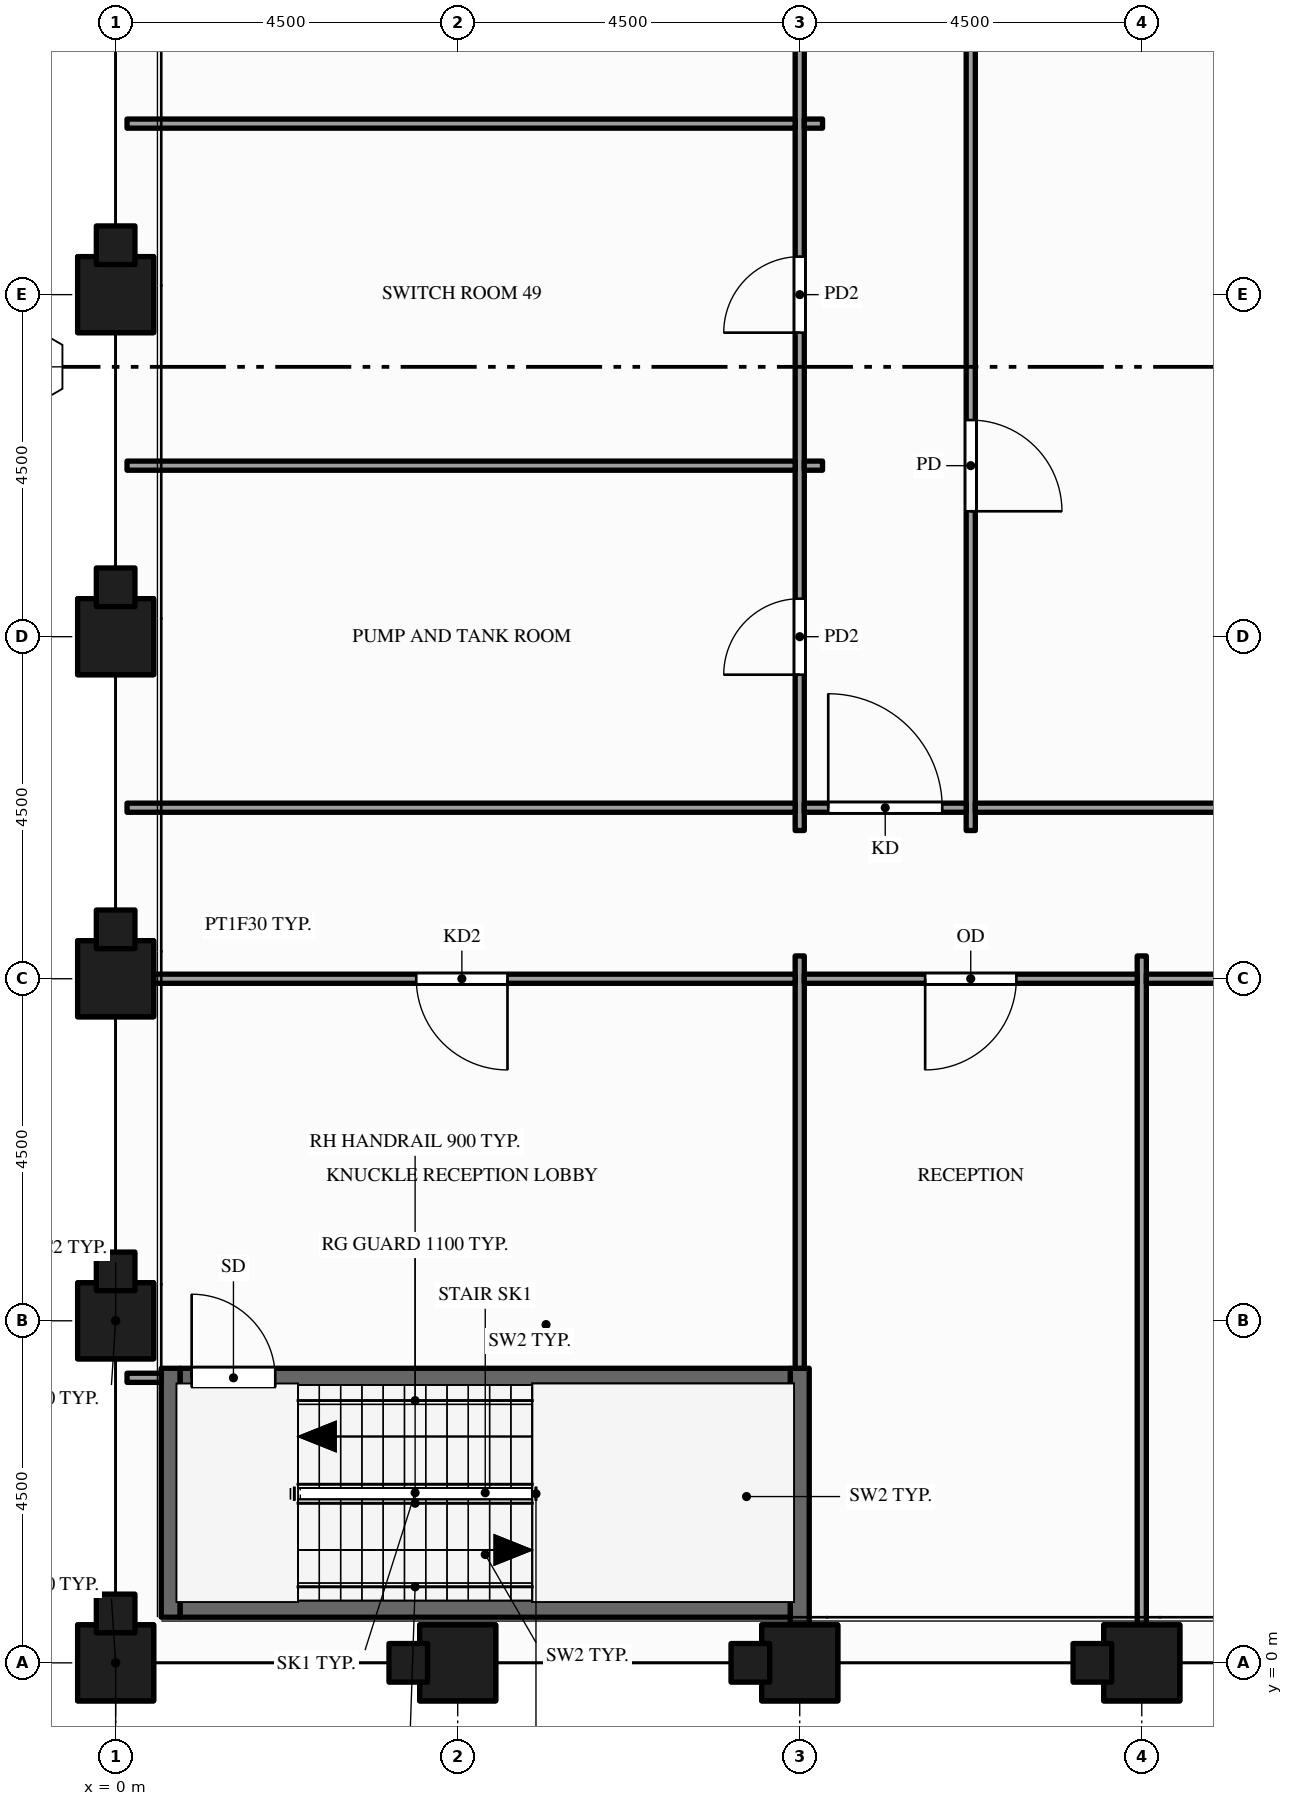
"""IFC4 building model, lengths in metres.
Left out: names, types, materials, properties, quantities, classifications, styles, units other than length and angle.
Written with IfcOpenShell. Run it as: python <this file> out.ifc"""

import sys

from ifc_helpers import new_model, si_unit, direction, frame, frame_2d, origin, origin_2d, place, context, subcontext, project, spatial, rectangle, hollow_rectangle, extrude, element, fill, save


model = new_model("IFC4")
c1 = context("Model", 3, precision=1e-05, world=origin(), true_north=direction((0.0, 1.0)))
c2 = subcontext(c1, "Body", "Model", "MODEL_VIEW")
j1 = project(units=[si_unit("LENGTHUNIT", "METRE"), si_unit("PLANEANGLEUNIT", "RADIAN")], contexts=[c1])
p1 = place(None, origin())
s1 = spatial("IfcSite", under=j1, at=p1, CompositionType="ELEMENT")
p2 = place(p1, origin())
s2 = spatial("IfcBuilding", under=s1, at=p2, CompositionType="ELEMENT")
p3 = place(p2, frame((0.0, 0.0, 131.0)))
s3 = spatial("IfcBuildingStorey", under=s2, at=p3, CompositionType="ELEMENT", Elevation=131.0)
p4 = place(p3, frame((0.0, 0.0, -0.25), z_axis=(0.0, 0.0, 1.0), x_axis=(1.0, 0.0, 0.0)))
e1 = element("IfcColumn", 1, at=p4, inside=s3, PredefinedType="COLUMN", context=c2, shape_type="SweptSolid", body=[
    extrude(hollow_rectangle(XDim=1.0, YDim=1.0, WallThickness=0.05, at=origin_2d()), origin(), (0.0, 0.0, 1.0), 6.6),
])
p5 = place(p3, frame((0.0, 0.0, 6.35), z_axis=(0.0, 0.0, 1.0), x_axis=(1.0, 0.0, 0.0)))
e2 = element("IfcColumn", 2, at=p5, inside=s3, PredefinedType="COLUMN", context=c2, shape_type="SweptSolid", body=[
    extrude(rectangle(XDim=1.0, YDim=1.0, at=origin_2d()), origin(), (0.0, 0.0, 1.0), 1.5),
])
p6 = place(p3, frame((0.0, 4.5, -0.25), z_axis=(0.0, 0.0, 1.0), x_axis=(1.0, 0.0, 0.0)))
e3 = element("IfcColumn", 3, at=p6, inside=s3, PredefinedType="COLUMN", context=c2, shape_type="SweptSolid", body=[
    extrude(hollow_rectangle(XDim=1.0, YDim=1.0, WallThickness=0.05, at=origin_2d()), origin(), (0.0, 0.0, 1.0), 6.6),
])
p7 = place(p3, frame((0.0, 4.5, 6.35), z_axis=(0.0, 0.0, 1.0), x_axis=(1.0, 0.0, 0.0)))
e4 = element("IfcColumn", 4, at=p7, inside=s3, PredefinedType="COLUMN", context=c2, shape_type="SweptSolid", body=[
    extrude(rectangle(XDim=1.0, YDim=1.0, at=origin_2d()), origin(), (0.0, 0.0, 1.0), 1.5),
])
p8 = place(p3, frame((0.0, 9.0, -0.25), z_axis=(0.0, 0.0, 1.0), x_axis=(1.0, 0.0, 0.0)))
e5 = element("IfcColumn", 5, at=p8, inside=s3, PredefinedType="COLUMN", context=c2, shape_type="SweptSolid", body=[
    extrude(hollow_rectangle(XDim=1.0, YDim=1.0, WallThickness=0.05, at=origin_2d()), origin(), (0.0, 0.0, 1.0), 6.6),
])
p9 = place(p3, frame((0.0, 9.0, 6.35), z_axis=(0.0, 0.0, 1.0), x_axis=(1.0, 0.0, 0.0)))
e6 = element("IfcColumn", 6, at=p9, inside=s3, PredefinedType="COLUMN", context=c2, shape_type="SweptSolid", body=[
    extrude(rectangle(XDim=1.0, YDim=1.0, at=origin_2d()), origin(), (0.0, 0.0, 1.0), 1.5),
])
p10 = place(p3, frame((0.0, 13.5, -0.25), z_axis=(0.0, 0.0, 1.0), x_axis=(1.0, 0.0, 0.0)))
e7 = element("IfcColumn", 7, at=p10, inside=s3, PredefinedType="COLUMN", context=c2, shape_type="SweptSolid", body=[
    extrude(hollow_rectangle(XDim=1.0, YDim=1.0, WallThickness=0.05, at=origin_2d()), origin(), (0.0, 0.0, 1.0), 6.6),
])
p11 = place(p3, frame((0.0, 13.5, 6.35), z_axis=(0.0, 0.0, 1.0), x_axis=(1.0, 0.0, 0.0)))
e8 = element("IfcColumn", 8, at=p11, inside=s3, PredefinedType="COLUMN", context=c2, shape_type="SweptSolid", body=[
    extrude(rectangle(XDim=1.0, YDim=1.0, at=origin_2d()), origin(), (0.0, 0.0, 1.0), 1.5),
])
p12 = place(p3, frame((0.0, 18.0, -0.25), z_axis=(0.0, 0.0, 1.0), x_axis=(1.0, 0.0, 0.0)))
e9 = element("IfcColumn", 9, at=p12, inside=s3, PredefinedType="COLUMN", context=c2, shape_type="SweptSolid", body=[
    extrude(hollow_rectangle(XDim=1.0, YDim=1.0, WallThickness=0.05, at=origin_2d()), origin(), (0.0, 0.0, 1.0), 6.6),
])
p13 = place(p3, frame((0.0, 18.0, 6.35), z_axis=(0.0, 0.0, 1.0), x_axis=(1.0, 0.0, 0.0)))
e10 = element("IfcColumn", 10, at=p13, inside=s3, PredefinedType="COLUMN", context=c2, shape_type="SweptSolid", body=[
    extrude(rectangle(XDim=1.0, YDim=1.0, at=origin_2d()), origin(), (0.0, 0.0, 1.0), 1.5),
])
p14 = place(p3, frame((4.5, 0.0, -0.25), z_axis=(0.0, 0.0, 1.0), x_axis=(1.0, 0.0, 0.0)))
e11 = element("IfcColumn", 11, at=p14, inside=s3, PredefinedType="COLUMN", context=c2, shape_type="SweptSolid", body=[
    extrude(hollow_rectangle(XDim=1.0, YDim=1.0, WallThickness=0.05, at=origin_2d()), origin(), (0.0, 0.0, 1.0), 6.6),
])
p15 = place(p3, frame((4.5, 0.0, 6.35), z_axis=(0.0, 0.0, 1.0), x_axis=(1.0, 0.0, 0.0)))
e12 = element("IfcColumn", 12, at=p15, inside=s3, PredefinedType="COLUMN", context=c2, shape_type="SweptSolid", body=[
    extrude(rectangle(XDim=1.0, YDim=1.0, at=origin_2d()), origin(), (0.0, 0.0, 1.0), 1.5),
])
p16 = place(p3, frame((9.0, 0.0, -0.25), z_axis=(0.0, 0.0, 1.0), x_axis=(1.0, 0.0, 0.0)))
e13 = element("IfcColumn", 13, at=p16, inside=s3, PredefinedType="COLUMN", context=c2, shape_type="SweptSolid", body=[
    extrude(hollow_rectangle(XDim=1.0, YDim=1.0, WallThickness=0.05, at=origin_2d()), origin(), (0.0, 0.0, 1.0), 6.6),
])
p17 = place(p3, frame((9.0, 0.0, 6.35), z_axis=(0.0, 0.0, 1.0), x_axis=(1.0, 0.0, 0.0)))
e14 = element("IfcColumn", 14, at=p17, inside=s3, PredefinedType="COLUMN", context=c2, shape_type="SweptSolid", body=[
    extrude(rectangle(XDim=1.0, YDim=1.0, at=origin_2d()), origin(), (0.0, 0.0, 1.0), 1.5),
])
p18 = place(p3, frame((13.5, 0.0, -0.25), z_axis=(0.0, 0.0, 1.0), x_axis=(1.0, 0.0, 0.0)))
e15 = element("IfcColumn", 15, at=p18, inside=s3, PredefinedType="COLUMN", context=c2, shape_type="SweptSolid", body=[
    extrude(hollow_rectangle(XDim=1.0, YDim=1.0, WallThickness=0.05, at=origin_2d()), origin(), (0.0, 0.0, 1.0), 6.6),
])
p19 = place(p3, frame((13.5, 0.0, 6.35), z_axis=(0.0, 0.0, 1.0), x_axis=(1.0, 0.0, 0.0)))
e16 = element("IfcColumn", 16, at=p19, inside=s3, PredefinedType="COLUMN", context=c2, shape_type="SweptSolid", body=[
    extrude(rectangle(XDim=1.0, YDim=1.0, at=origin_2d()), origin(), (0.0, 0.0, 1.0), 1.5),
])
p20 = place(p3, frame((0.725, 0.6, 0.0), z_axis=(0.0, 0.0, 1.0), x_axis=(0.0, 1.0, 0.0)))
e17 = element("IfcWall", 17, at=p20, inside=s3, PredefinedType="SHEAR", context=c2, shape_type="SweptSolid", body=[
    extrude(rectangle(XDim=3.275, YDim=0.25, at=frame_2d((1.637, 0.0))), origin(), (0.0, 0.0, 1.0), 7.85),
])
p21 = place(p3, frame((9.0, 0.15, 0.0), z_axis=(0.0, 0.0, 1.0), x_axis=(0.0, 1.0, 0.0)))
e18 = element("IfcWall", 18, at=p21, inside=s3, PredefinedType="PARTITIONING", context=c2, shape_type="SweptSolid", body=[
    extrude(rectangle(XDim=0.35, YDim=0.12, at=frame_2d((0.175, 0.0))), origin(), (0.0, 0.0, 1.0), 7.85),
])
p22 = place(p3, frame((9.0, 0.5, 0.0), z_axis=(0.0, 0.0, 1.0), x_axis=(0.0, 1.0, 0.0)))
e19 = element("IfcWall", 19, at=p22, inside=s3, PredefinedType="SHEAR", context=c2, shape_type="SweptSolid", body=[
    extrude(rectangle(XDim=3.375, YDim=0.25, at=frame_2d((1.688, 0.0))), origin(), (0.0, 0.0, 1.0), 7.85),
])
p23 = place(p3, frame((9.0, 3.875, 0.0), z_axis=(0.0, 0.0, 1.0), x_axis=(0.0, 1.0, 0.0)))
e20 = element("IfcWall", 20, at=p23, inside=s3, PredefinedType="PARTITIONING", context=c2, shape_type="SweptSolid", body=[
    extrude(rectangle(XDim=5.425, YDim=0.12, at=frame_2d((2.712, 0.0))), origin(), (0.0, 0.0, 1.0), 6.87),
])
p24 = place(p3, frame((9.0, 10.95, 0.0), z_axis=(0.0, 0.0, 1.0), x_axis=(0.0, 1.0, 0.0)))
e21 = element("IfcWall", 21, at=p24, inside=s3, PredefinedType="PARTITIONING", context=c2, shape_type="SweptSolid", body=[
    extrude(rectangle(XDim=20.85, YDim=0.12, at=frame_2d((10.425, 0.0))), origin(), (0.0, 0.0, 1.0), 6.6),
])
p25 = place(p24, frame((2.05, 0.0, 0.0)))
e22 = element("IfcOpeningElement", 22, at=p25, cuts=e21, PredefinedType="OPENING", context=c2, shape_type="SweptSolid", body=[
    extrude(rectangle(XDim=1.0, YDim=2.1, at=frame_2d((0.5, 1.05))), frame((0.0, 0.07, 0.0), z_axis=(0.0, -1.0, 0.0), x_axis=(1.0, 0.0, 0.0)), (0.0, 0.0, 1.0), 0.14),
])
p26 = place(p24, frame((6.55, 0.0, 0.0)))
e23 = element("IfcOpeningElement", 23, at=p26, cuts=e21, PredefinedType="OPENING", context=c2, shape_type="SweptSolid", body=[
    extrude(rectangle(XDim=1.0, YDim=2.1, at=frame_2d((0.5, 1.05))), frame((0.0, 0.07, 0.0), z_axis=(0.0, -1.0, 0.0), x_axis=(1.0, 0.0, 0.0)), (0.0, 0.0, 1.0), 0.14),
])
p27 = place(p24, frame((12.105, 0.0, 0.0)))
e24 = element("IfcOpeningElement", 24, at=p27, cuts=e21, PredefinedType="OPENING", context=c2, shape_type="SweptSolid", body=[
    extrude(rectangle(XDim=1.2, YDim=2.1, at=frame_2d((0.6, 1.05))), frame((0.0, 0.07, 0.0), z_axis=(0.0, -1.0, 0.0), x_axis=(1.0, 0.0, 0.0)), (0.0, 0.0, 1.0), 0.14),
])
p28 = place(p3, frame((11.25, 10.95, 0.0), z_axis=(0.0, 0.0, 1.0), x_axis=(0.0, 1.0, 0.0)))
e25 = element("IfcWall", 25, at=p28, inside=s3, PredefinedType="PARTITIONING", context=c2, shape_type="SweptSolid", body=[
    extrude(rectangle(XDim=20.85, YDim=0.12, at=frame_2d((10.425, 0.0))), origin(), (0.0, 0.0, 1.0), 6.6),
])
p29 = place(p28, frame((17.8, 0.0, 0.0)))
e26 = element("IfcOpeningElement", 26, at=p29, cuts=e25, PredefinedType="OPENING", context=c2, shape_type="SweptSolid", body=[
    extrude(rectangle(XDim=1.0, YDim=2.1, at=frame_2d((0.5, 1.05))), frame((0.0, 0.07, 0.0), z_axis=(0.0, -1.0, 0.0), x_axis=(1.0, 0.0, 0.0)), (0.0, 0.0, 1.0), 0.14),
])
p30 = place(p28, frame((4.2, 0.0, 0.0)))
e27 = element("IfcOpeningElement", 27, at=p30, cuts=e25, PredefinedType="OPENING", context=c2, shape_type="SweptSolid", body=[
    extrude(rectangle(XDim=1.2, YDim=2.1, at=frame_2d((0.6, 1.05))), frame((0.0, 0.07, 0.0), z_axis=(0.0, -1.0, 0.0), x_axis=(1.0, 0.0, 0.0)), (0.0, 0.0, 1.0), 0.14),
])
p31 = place(p3, frame((13.5, 0.15, 0.0), z_axis=(0.0, 0.0, 1.0), x_axis=(0.0, 1.0, 0.0)))
e28 = element("IfcWall", 28, at=p31, inside=s3, PredefinedType="PARTITIONING", context=c2, shape_type="SweptSolid", body=[
    extrude(rectangle(XDim=9.15, YDim=0.12, at=frame_2d((4.575, 0.0))), origin(), (0.0, 0.0, 1.0), 6.87),
])
p32 = place(p3, frame((0.85, 0.725, 0.0), z_axis=(0.0, 0.0, 1.0), x_axis=(1.0, 0.0, 0.0)))
e29 = element("IfcWall", 29, at=p32, inside=s3, PredefinedType="SHEAR", context=c2, shape_type="SweptSolid", body=[
    extrude(rectangle(XDim=8.025, YDim=0.25, at=frame_2d((4.012, 0.0))), origin(), (0.0, 0.0, 1.0), 7.85),
])
p33 = place(p3, frame((0.15, 3.75, 0.0), z_axis=(0.0, 0.0, 1.0), x_axis=(1.0, 0.0, 0.0)))
e30 = element("IfcWall", 30, at=p33, inside=s3, PredefinedType="PARTITIONING", context=c2, shape_type="SweptSolid", body=[
    extrude(rectangle(XDim=0.45, YDim=0.12, at=frame_2d((0.225, 0.0))), origin(), (0.0, 0.0, 1.0), 7.85),
])
p34 = place(p3, frame((0.85, 3.75, 0.0), z_axis=(0.0, 0.0, 1.0), x_axis=(1.0, 0.0, 0.0)))
e31 = element("IfcWall", 31, at=p34, inside=s3, PredefinedType="SHEAR", context=c2, shape_type="SweptSolid", body=[
    extrude(rectangle(XDim=8.025, YDim=0.25, at=frame_2d((4.012, 0.0))), origin(), (0.0, 0.0, 1.0), 7.85),
])
p35 = place(p34, frame((0.15, 0.0, 0.0)))
e32 = element("IfcOpeningElement", 32, at=p35, cuts=e31, PredefinedType="OPENING", context=c2, shape_type="SweptSolid", body=[
    extrude(rectangle(XDim=1.1, YDim=2.1, at=frame_2d((0.55, 1.05))), frame((0.0, 0.135, 0.0), z_axis=(0.0, -1.0, 0.0), x_axis=(1.0, 0.0, 0.0)), (0.0, 0.0, 1.0), 0.27),
])
p36 = place(p3, frame((0.15, 9.0, 0.0), z_axis=(0.0, 0.0, 1.0), x_axis=(1.0, 0.0, 0.0)))
e33 = element("IfcWall", 33, at=p36, inside=s3, PredefinedType="PARTITIONING", context=c2, shape_type="SweptSolid", body=[
    extrude(rectangle(XDim=8.79, YDim=0.12, at=frame_2d((4.395, 0.0))), origin(), (0.0, 0.0, 1.0), 6.87),
])
p37 = place(p36, frame((3.805, 0.0, 0.0)))
e34 = element("IfcOpeningElement", 34, at=p37, cuts=e33, PredefinedType="OPENING", context=c2, shape_type="SweptSolid", body=[
    extrude(rectangle(XDim=1.2, YDim=2.1, at=frame_2d((0.6, 1.05))), frame((0.0, 0.07, 0.0), z_axis=(0.0, -1.0, 0.0), x_axis=(1.0, 0.0, 0.0)), (0.0, 0.0, 1.0), 0.14),
])
p38 = place(p3, frame((9.06, 9.0, 0.0), z_axis=(0.0, 0.0, 1.0), x_axis=(1.0, 0.0, 0.0)))
e35 = element("IfcWall", 35, at=p38, inside=s3, PredefinedType="PARTITIONING", context=c2, shape_type="SweptSolid", body=[
    extrude(rectangle(XDim=4.38, YDim=0.12, at=frame_2d((2.19, 0.0))), origin(), (0.0, 0.0, 1.0), 6.87),
])
p39 = place(p38, frame((1.59, 0.0, 0.0)))
e36 = element("IfcOpeningElement", 36, at=p39, cuts=e35, PredefinedType="OPENING", context=c2, shape_type="SweptSolid", body=[
    extrude(rectangle(XDim=1.2, YDim=2.1, at=frame_2d((0.6, 1.05))), frame((0.0, 0.07, 0.0), z_axis=(0.0, -1.0, 0.0), x_axis=(1.0, 0.0, 0.0)), (0.0, 0.0, 1.0), 0.14),
])
p40 = place(p3, frame((13.56, 9.0, 0.0), z_axis=(0.0, 0.0, 1.0), x_axis=(1.0, 0.0, 0.0)))
e37 = element("IfcWall", 37, at=p40, inside=s3, PredefinedType="PARTITIONING", context=c2, shape_type="SweptSolid", body=[
    extrude(rectangle(XDim=8.88, YDim=0.12, at=frame_2d((4.44, 0.0))), origin(), (0.0, 0.0, 1.0), 6.87),
])
p41 = place(p40, frame((3.54, 0.0, 0.0)))
e38 = element("IfcOpeningElement", 38, at=p41, cuts=e37, PredefinedType="OPENING", context=c2, shape_type="SweptSolid", body=[
    extrude(rectangle(XDim=1.8, YDim=2.1, at=frame_2d((0.9, 1.05))), frame((0.0, 0.07, 0.0), z_axis=(0.0, -1.0, 0.0), x_axis=(1.0, 0.0, 0.0)), (0.0, 0.0, 1.0), 0.14),
])
p42 = place(p3, frame((0.15, 11.25, 0.0), z_axis=(0.0, 0.0, 1.0), x_axis=(1.0, 0.0, 0.0)))
e39 = element("IfcWall", 39, at=p42, inside=s3, PredefinedType="PARTITIONING", context=c2, shape_type="SweptSolid", body=[
    extrude(rectangle(XDim=8.79, YDim=0.12, at=frame_2d((4.395, 0.0))), origin(), (0.0, 0.0, 1.0), 6.87),
])
p43 = place(p3, frame((9.06, 11.25, 0.0), z_axis=(0.0, 0.0, 1.0), x_axis=(1.0, 0.0, 0.0)))
e40 = element("IfcWall", 40, at=p43, inside=s3, PredefinedType="PARTITIONING", context=c2, shape_type="SweptSolid", body=[
    extrude(rectangle(XDim=2.13, YDim=0.12, at=frame_2d((1.065, 0.0))), origin(), (0.0, 0.0, 1.0), 6.87),
])
p44 = place(p43, frame((0.315, 0.0, 0.0)))
e41 = element("IfcOpeningElement", 41, at=p44, cuts=e40, PredefinedType="OPENING", context=c2, shape_type="SweptSolid", body=[
    extrude(rectangle(XDim=1.5, YDim=2.1, at=frame_2d((0.75, 1.05))), frame((0.0, 0.07, 0.0), z_axis=(0.0, -1.0, 0.0), x_axis=(1.0, 0.0, 0.0)), (0.0, 0.0, 1.0), 0.14),
])
p45 = place(p3, frame((11.31, 11.25, 0.0), z_axis=(0.0, 0.0, 1.0), x_axis=(1.0, 0.0, 0.0)))
e42 = element("IfcWall", 42, at=p45, inside=s3, PredefinedType="PARTITIONING", context=c2, shape_type="SweptSolid", body=[
    extrude(rectangle(XDim=20.13, YDim=0.12, at=frame_2d((10.065, 0.0))), origin(), (0.0, 0.0, 1.0), 6.87),
])
p46 = place(p45, frame((9.165, 0.0, 0.0)))
e43 = element("IfcOpeningElement", 43, at=p46, cuts=e42, PredefinedType="OPENING", context=c2, shape_type="SweptSolid", body=[
    extrude(rectangle(XDim=1.8, YDim=2.1, at=frame_2d((0.9, 1.05))), frame((0.0, 0.07, 0.0), z_axis=(0.0, -1.0, 0.0), x_axis=(1.0, 0.0, 0.0)), (0.0, 0.0, 1.0), 0.14),
])
p47 = place(p3, frame((0.15, 15.75, 0.0), z_axis=(0.0, 0.0, 1.0), x_axis=(1.0, 0.0, 0.0)))
e44 = element("IfcWall", 44, at=p47, inside=s3, PredefinedType="PARTITIONING", context=c2, shape_type="SweptSolid", body=[
    extrude(rectangle(XDim=8.79, YDim=0.12, at=frame_2d((4.395, 0.0))), origin(), (0.0, 0.0, 1.0), 6.87),
])
p48 = place(p3, frame((9.06, 15.75, 0.0), z_axis=(0.0, 0.0, 1.0), x_axis=(1.0, 0.0, 0.0)))
e45 = element("IfcWall", 45, at=p48, inside=s3, PredefinedType="PARTITIONING", context=c2, shape_type="SweptSolid", body=[
    extrude(rectangle(XDim=0.24, YDim=0.12, at=frame_2d((0.12, 0.0))), origin(), (0.0, 0.0, 1.0), 6.87),
])
p49 = place(p3, frame((0.15, 20.25, 0.0), z_axis=(0.0, 0.0, 1.0), x_axis=(1.0, 0.0, 0.0)))
e46 = element("IfcWall", 46, at=p49, inside=s3, PredefinedType="PARTITIONING", context=c2, shape_type="SweptSolid", body=[
    extrude(rectangle(XDim=8.79, YDim=0.12, at=frame_2d((4.395, 0.0))), origin(), (0.0, 0.0, 1.0), 6.87),
])
p50 = place(p3, frame((9.06, 20.25, 0.0), z_axis=(0.0, 0.0, 1.0), x_axis=(1.0, 0.0, 0.0)))
e47 = element("IfcWall", 47, at=p50, inside=s3, PredefinedType="PARTITIONING", context=c2, shape_type="SweptSolid", body=[
    extrude(rectangle(XDim=0.24, YDim=0.12, at=frame_2d((0.12, 0.0))), origin(), (0.0, 0.0, 1.0), 6.87),
])
p51 = place(p35, origin())
e48 = element("IfcDoor", 48, at=p51, inside=s3, OperationType="SINGLE_SWING_LEFT", PredefinedType="DOOR", context=c2, shape_type="SweptSolid", body=[
    extrude(rectangle(XDim=1.1, YDim=2.1, at=frame_2d((0.55, 1.05))), frame((0.0, 0.025, 0.0), z_axis=(0.0, -1.0, 0.0), x_axis=(1.0, 0.0, 0.0)), (0.0, 0.0, 1.0), 0.05),
])
fill(e32, e48)
p52 = place(p37, origin())
e49 = element("IfcDoor", 49, at=p52, inside=s3, OperationType="SINGLE_SWING_RIGHT", PredefinedType="DOOR", context=c2, shape_type="SweptSolid", body=[
    extrude(rectangle(XDim=1.2, YDim=2.1, at=frame_2d((0.6, 1.05))), frame((0.0, 0.025, 0.0), z_axis=(0.0, -1.0, 0.0), x_axis=(1.0, 0.0, 0.0)), (0.0, 0.0, 1.0), 0.05),
])
fill(e34, e49)
p53 = place(p39, origin())
e50 = element("IfcDoor", 50, at=p53, inside=s3, OperationType="SINGLE_SWING_LEFT", PredefinedType="DOOR", context=c2, shape_type="SweptSolid", body=[
    extrude(rectangle(XDim=1.2, YDim=2.1, at=frame_2d((0.6, 1.05))), frame((0.0, 0.025, 0.0), z_axis=(0.0, -1.0, 0.0), x_axis=(1.0, 0.0, 0.0)), (0.0, 0.0, 1.0), 0.05),
])
fill(e36, e50)
p54 = place(p44, origin())
e51 = element("IfcDoor", 51, at=p54, inside=s3, OperationType="SINGLE_SWING_LEFT", PredefinedType="DOOR", context=c2, shape_type="SweptSolid", body=[
    extrude(rectangle(XDim=1.5, YDim=2.1, at=frame_2d((0.75, 1.05))), frame((0.0, 0.025, 0.0), z_axis=(0.0, -1.0, 0.0), x_axis=(1.0, 0.0, 0.0)), (0.0, 0.0, 1.0), 0.05),
])
fill(e41, e51)
p55 = place(p25, origin())
e52 = element("IfcDoor", 52, at=p55, inside=s3, OperationType="SINGLE_SWING_LEFT", PredefinedType="DOOR", context=c2, shape_type="SweptSolid", body=[
    extrude(rectangle(XDim=1.0, YDim=2.1, at=frame_2d((0.5, 1.05))), frame((0.0, 0.025, 0.0), z_axis=(0.0, -1.0, 0.0), x_axis=(1.0, 0.0, 0.0)), (0.0, 0.0, 1.0), 0.05),
])
fill(e22, e52)
p56 = place(p26, origin())
e53 = element("IfcDoor", 53, at=p56, inside=s3, OperationType="SINGLE_SWING_LEFT", PredefinedType="DOOR", context=c2, shape_type="SweptSolid", body=[
    extrude(rectangle(XDim=1.0, YDim=2.1, at=frame_2d((0.5, 1.05))), frame((0.0, 0.025, 0.0), z_axis=(0.0, -1.0, 0.0), x_axis=(1.0, 0.0, 0.0)), (0.0, 0.0, 1.0), 0.05),
])
fill(e23, e53)
p57 = place(p30, origin())
e54 = element("IfcDoor", 54, at=p57, inside=s3, OperationType="SINGLE_SWING_LEFT", PredefinedType="DOOR", context=c2, shape_type="SweptSolid", body=[
    extrude(rectangle(XDim=1.2, YDim=2.1, at=frame_2d((0.6, 1.05))), frame((0.0, 0.025, 0.0), z_axis=(0.0, -1.0, 0.0), x_axis=(1.0, 0.0, 0.0)), (0.0, 0.0, 1.0), 0.05),
])
fill(e27, e54)
save(model, sys.argv[1])
